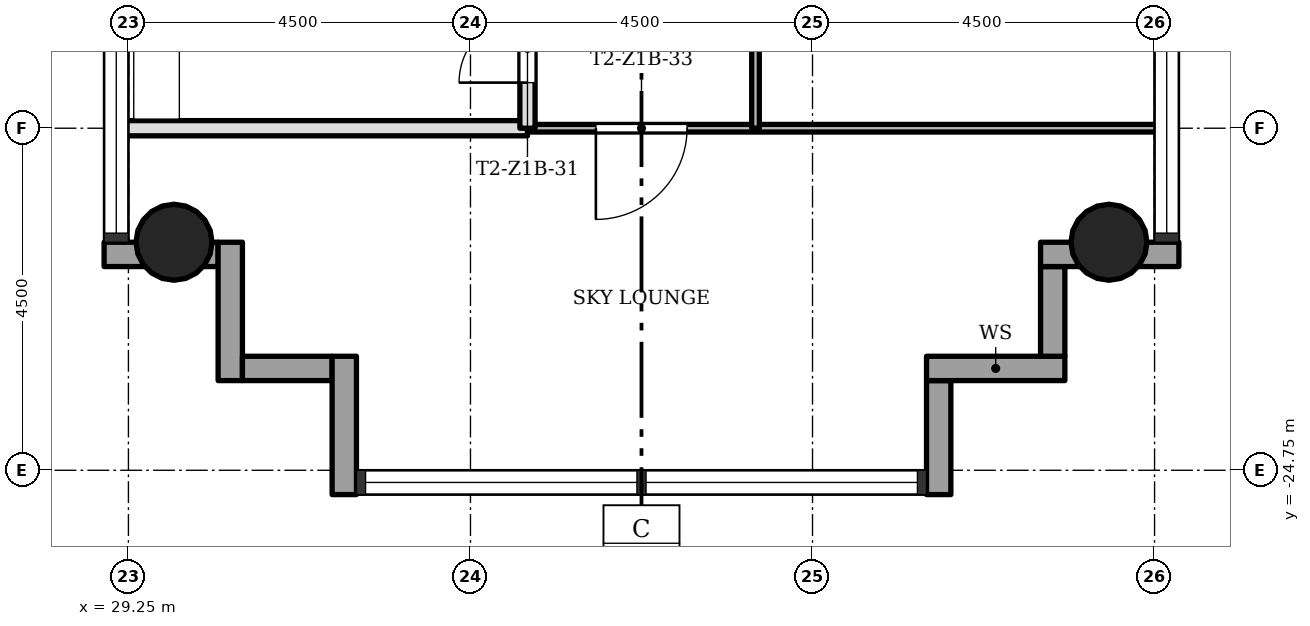
"""IFC4 building model, lengths in metres.
Left out: names, types, materials, properties, quantities, classifications, styles, units other than length and angle.
Written with IfcOpenShell. Run it as: python <this file> out.ifc"""

import sys

from ifc_helpers import new_model, si_unit, direction, frame, frame_2d, origin, origin_2d, place, context, subcontext, project, spatial, rectangle, hollow_circle, extrude, element, fill, save


model = new_model("IFC4")
c1 = context("Model", 3, precision=1e-05, world=origin(), true_north=direction((0.0, 1.0)))
c2 = subcontext(c1, "Body", "Model", "MODEL_VIEW")
j1 = project(units=[si_unit("LENGTHUNIT", "METRE"), si_unit("PLANEANGLEUNIT", "RADIAN")], contexts=[c1])
p1 = place(None, origin())
s1 = spatial("IfcSite", under=j1, at=p1, CompositionType="ELEMENT")
p2 = place(p1, origin())
s2 = spatial("IfcBuilding", under=s1, at=p2, CompositionType="ELEMENT")
p3 = place(p2, frame((0.0, 0.0, 41.5)))
s3 = spatial("IfcBuildingStorey", under=s2, at=p3, CompositionType="ELEMENT", Elevation=41.5)
for number, where, z_axis, x_axis in (
    (1, (42.15, -21.75, 0.0), (0.0, 0.0, 1.0), (1.0, 0.0, 0.0)),
    (2, (29.85, -21.75, 0.0), (0.0, 0.0, 1.0), (1.0, 0.0, 0.0)),
):
    element("IfcColumn", number, at=place(p3, frame(where, z_axis=z_axis, x_axis=x_axis)), inside=s3, PredefinedType="COLUMN", context=c2, shape_type="SweptSolid", body=[
        extrude(hollow_circle(Radius=0.5, WallThickness=0.036, at=origin_2d()), origin(), (0.0, 0.0, 1.0), 3.4),
    ])
p4 = place(p3, frame((39.91, -25.07, -0.3), z_axis=(0.0, 0.0, 1.0), x_axis=(0.0, 1.0, 0.0)))
e3 = element("IfcWall", 3, at=p4, inside=s3, PredefinedType="STANDARD", context=c2, shape_type="SweptSolid", body=[
    extrude(rectangle(XDim=1.5, YDim=0.32, at=frame_2d((0.75, 0.0))), origin(), (0.0, 0.0, 1.0), 3.4),
])
p5 = place(p3, frame((39.75, -23.41, -0.3), z_axis=(0.0, 0.0, 1.0), x_axis=(1.0, 0.0, 0.0)))
e4 = element("IfcWall", 4, at=p5, inside=s3, PredefinedType="STANDARD", context=c2, shape_type="SweptSolid", body=[
    extrude(rectangle(XDim=1.82, YDim=0.32, at=frame_2d((0.91, 0.0))), origin(), (0.0, 0.0, 1.0), 3.4),
])
p6 = place(p3, frame((41.41, -23.25, -0.3), z_axis=(0.0, 0.0, 1.0), x_axis=(0.0, 1.0, 0.0)))
e5 = element("IfcWall", 5, at=p6, inside=s3, PredefinedType="STANDARD", context=c2, shape_type="SweptSolid", body=[
    extrude(rectangle(XDim=1.18, YDim=0.32, at=frame_2d((0.59, 0.0))), origin(), (0.0, 0.0, 1.0), 3.4),
])
p7 = place(p3, frame((41.25, -21.91, -0.3), z_axis=(0.0, 0.0, 1.0), x_axis=(1.0, 0.0, 0.0)))
e6 = element("IfcWall", 6, at=p7, inside=s3, PredefinedType="STANDARD", context=c2, shape_type="SweptSolid", body=[
    extrude(rectangle(XDim=1.82, YDim=0.32, at=frame_2d((0.91, 0.0))), origin(), (0.0, 0.0, 1.0), 3.4),
])
p8 = place(p3, frame((28.93, -21.91, -0.3), z_axis=(0.0, 0.0, 1.0), x_axis=(1.0, 0.0, 0.0)))
e7 = element("IfcWall", 7, at=p8, inside=s3, PredefinedType="STANDARD", context=c2, shape_type="SweptSolid", body=[
    extrude(rectangle(XDim=1.5, YDim=0.32, at=frame_2d((0.75, 0.0))), origin(), (0.0, 0.0, 1.0), 3.4),
])
p9 = place(p3, frame((30.59, -21.75, -0.3), z_axis=(0.0, 0.0, 1.0), x_axis=(0.0, -1.0, 0.0)))
e8 = element("IfcWall", 8, at=p9, inside=s3, PredefinedType="STANDARD", context=c2, shape_type="SweptSolid", body=[
    extrude(rectangle(XDim=1.82, YDim=0.32, at=frame_2d((0.91, 0.0))), origin(), (0.0, 0.0, 1.0), 3.4),
])
p10 = place(p3, frame((30.75, -23.41, -0.3), z_axis=(0.0, 0.0, 1.0), x_axis=(1.0, 0.0, 0.0)))
e9 = element("IfcWall", 9, at=p10, inside=s3, PredefinedType="STANDARD", context=c2, shape_type="SweptSolid", body=[
    extrude(rectangle(XDim=1.18, YDim=0.32, at=frame_2d((0.59, 0.0))), origin(), (0.0, 0.0, 1.0), 3.4),
])
p11 = place(p3, frame((32.09, -23.25, -0.3), z_axis=(0.0, 0.0, 1.0), x_axis=(0.0, -1.0, 0.0)))
e10 = element("IfcWall", 10, at=p11, inside=s3, PredefinedType="STANDARD", context=c2, shape_type="SweptSolid", body=[
    extrude(rectangle(XDim=1.82, YDim=0.32, at=frame_2d((0.91, 0.0))), origin(), (0.0, 0.0, 1.0), 3.4),
])
p12 = place(p3, frame((42.85, -20.25, 0.0), z_axis=(0.0, 0.0, 1.0), x_axis=(-1.0, 0.0, 0.0)))
e11 = element("IfcWall", 11, at=p12, inside=s3, PredefinedType="PARTITIONING", context=c2, shape_type="SweptSolid", body=[
    extrude(rectangle(XDim=8.35, YDim=0.1, at=frame_2d((4.175, 0.0))), origin(), (0.0, 0.0, 1.0), 3.0),
])
p13 = place(p12, frame((6.25, 0.0, 0.0)))
e12 = element("IfcOpeningElement", 12, at=p13, cuts=e11, PredefinedType="OPENING", context=c2, shape_type="SweptSolid", body=[
    extrude(rectangle(XDim=1.2, YDim=2.1, at=frame_2d((0.6, 1.05))), frame((0.0, 0.06, 0.0), z_axis=(0.0, -1.0, 0.0), x_axis=(1.0, 0.0, 0.0)), (0.0, 0.0, 1.0), 0.12),
])
p14 = place(p3, frame((34.5, -20.25, 0.0), z_axis=(0.0, 0.0, 1.0), x_axis=(-1.0, 0.0, 0.0)))
e13 = element("IfcWall", 13, at=p14, inside=s3, PredefinedType="SOLIDWALL", context=c2, shape_type="SweptSolid", body=[
    extrude(rectangle(XDim=5.35, YDim=0.2, at=frame_2d((2.675, 0.0))), origin(), (0.0, 0.0, 1.0), 3.0),
])
p15 = place(p3, frame((37.5, -20.25, 0.0), z_axis=(0.0, 0.0, 1.0), x_axis=(0.0, 1.0, 0.0)))
e14 = element("IfcWall", 14, at=p15, inside=s3, PredefinedType="PARTITIONING", context=c2, shape_type="SweptSolid", body=[
    extrude(rectangle(XDim=4.5, YDim=0.1, at=frame_2d((2.25, 0.0))), origin(), (0.0, 0.0, 1.0), 3.0),
])
p16 = place(p15, frame((1.8, 0.0, 0.0)))
e15 = element("IfcOpeningElement", 15, at=p16, cuts=e14, PredefinedType="OPENING", context=c2, shape_type="SweptSolid", body=[
    extrude(rectangle(XDim=0.9, YDim=2.1, at=frame_2d((0.45, 1.05))), frame((0.0, 0.06, 0.0), z_axis=(0.0, -1.0, 0.0), x_axis=(1.0, 0.0, 0.0)), (0.0, 0.0, 1.0), 0.12),
])
p17 = place(p3, frame((34.5, -20.25, 0.0), z_axis=(0.0, 0.0, 1.0), x_axis=(0.0, 1.0, 0.0)))
e16 = element("IfcWall", 16, at=p17, inside=s3, PredefinedType="SOLIDWALL", context=c2, shape_type="SweptSolid", body=[
    extrude(rectangle(XDim=4.5, YDim=0.2, at=frame_2d((2.25, 0.0))), origin(), (0.0, 0.0, 1.0), 3.0),
])
p18 = place(p17, frame((0.6, 0.0, 0.0)))
e17 = element("IfcOpeningElement", 17, at=p18, cuts=e16, PredefinedType="OPENING", context=c2, shape_type="SweptSolid", body=[
    extrude(rectangle(XDim=0.9, YDim=2.1, at=frame_2d((0.45, 1.05))), frame((0.0, 0.11, 0.0), z_axis=(0.0, -1.0, 0.0), x_axis=(1.0, 0.0, 0.0)), (0.0, 0.0, 1.0), 0.22),
])
p19 = place(p18, origin())
e18 = element("IfcDoor", 18, at=p19, inside=s3, OperationType="SINGLE_SWING_RIGHT", PredefinedType="DOOR", context=c2, shape_type="SweptSolid", body=[
    extrude(rectangle(XDim=0.9, YDim=2.1, at=frame_2d((0.45, 1.05))), frame((0.0, 0.025, 0.0), z_axis=(0.0, -1.0, 0.0), x_axis=(1.0, 0.0, 0.0)), (0.0, 0.0, 1.0), 0.05),
])
fill(e17, e18)
p20 = place(p13, origin())
e19 = element("IfcDoor", 19, at=p20, inside=s3, OperationType="SINGLE_SWING_LEFT", PredefinedType="DOOR", context=c2, shape_type="SweptSolid", body=[
    extrude(rectangle(XDim=1.2, YDim=2.1, at=frame_2d((0.6, 1.05))), frame((0.0, 0.025, 0.0), z_axis=(0.0, -1.0, 0.0), x_axis=(1.0, 0.0, 0.0)), (0.0, 0.0, 1.0), 0.05),
])
fill(e12, e19)
save(model, sys.argv[1])
